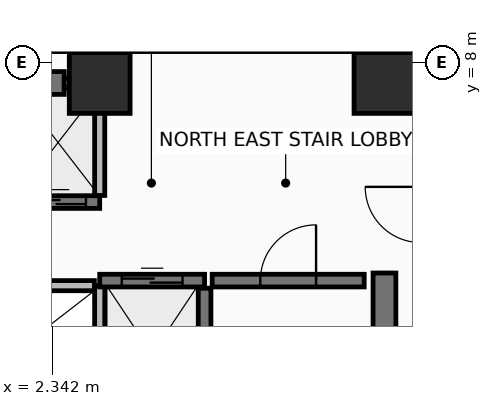
"""IFC4 building model, lengths in metres.
Left out: names, types, materials, properties, quantities, classifications, styles, units other than length and angle.
Written with IfcOpenShell. Run it as: python <this file> out.ifc"""

import sys

from ifc_helpers import new_model, si_unit, direction, frame, frame_2d, origin, origin_2d, place, context, subcontext, project, spatial, rectangle, extrude, element, fill, save


model = new_model("IFC4")
c1 = context("Model", 3, precision=1e-05, world=origin(), true_north=direction((0.0, 1.0)))
c2 = subcontext(c1, "Body", "Model", "MODEL_VIEW")
j1 = project(units=[si_unit("LENGTHUNIT", "METRE"), si_unit("PLANEANGLEUNIT", "RADIAN")], contexts=[c1])
p1 = place(None, origin())
s1 = spatial("IfcSite", under=j1, at=p1, CompositionType="ELEMENT")
p2 = place(p1, origin())
s2 = spatial("IfcBuilding", under=s1, at=p2, CompositionType="ELEMENT")
p3 = place(p2, frame((0.0, 0.0, 107.7)))
s3 = spatial("IfcBuildingStorey", under=s2, at=p3, CompositionType="ELEMENT", Elevation=107.7)
for number, where, z_axis, x_axis in (
    (1, (8.9, 7.6, 0.0), (0.0, 0.0, 1.0), (1.0, 0.0, 0.0)),
    (2, (3.28, 7.6, 0.0), (0.0, 0.0, 1.0), (1.0, 0.0, 0.0)),
):
    element("IfcColumn", number, at=place(p3, frame(where, z_axis=z_axis, x_axis=x_axis)), inside=s3, PredefinedType="COLUMN", context=c2, shape_type="SweptSolid", body=[
        extrude(rectangle(XDim=1.2, YDim=1.2, at=origin_2d()), origin(), (0.0, 0.0, 1.0), 4.75),
    ])
p4 = place(p3, frame((-2.8, 7.6, 0.0), z_axis=(0.0, 0.0, 1.0), x_axis=(1.0, 0.0, 0.0)))
e3 = element("IfcWall", 3, at=p4, inside=s3, PredefinedType="SHEAR", context=c2, shape_type="SweptSolid", body=[
    extrude(rectangle(XDim=5.38, YDim=0.45, at=frame_2d((2.69, 0.0))), origin(), (0.0, 0.0, 1.0), 4.56),
])
p5 = place(p3, frame((8.9, -6.85, 0.0), z_axis=(0.0, 0.0, 1.0), x_axis=(0.0, 1.0, 0.0)))
e4 = element("IfcWall", 4, at=p5, inside=s3, PredefinedType="SHEAR", context=c2, shape_type="SweptSolid", body=[
    extrude(rectangle(XDim=10.7, YDim=0.45, at=frame_2d((5.35, 0.0))), origin(), (0.0, 0.0, 1.0), 4.56),
])
p6 = place(p3, frame((5.35, -3.75, 0.0), z_axis=(0.0, 0.0, 1.0), x_axis=(0.0, 1.0, 0.0)))
e5 = element("IfcWall", 5, at=p6, inside=s3, PredefinedType="SHEAR", context=c2, shape_type="SweptSolid", body=[
    extrude(rectangle(XDim=7.3, YDim=0.25, at=frame_2d((3.65, 0.0))), origin(), (0.0, 0.0, 1.0), 4.56),
])
p7 = place(p3, frame((5.5, 3.7, 0.0), z_axis=(0.0, 0.0, 1.0), x_axis=(1.0, 0.0, 0.0)))
e6 = element("IfcWall", 6, at=p7, inside=s3, PredefinedType="SHEAR", context=c2, shape_type="SweptSolid", body=[
    extrude(rectangle(XDim=3.0, YDim=0.25, at=frame_2d((1.5, 0.0))), origin(), (0.0, 0.0, 1.0), 4.56),
])
p8 = place(p7, frame((0.95, 0.0, 0.0)))
e7 = element("IfcOpeningElement", 7, at=p8, cuts=e6, PredefinedType="OPENING", context=c2, shape_type="SweptSolid", body=[
    extrude(rectangle(XDim=1.1, YDim=2.15, at=frame_2d((0.55, 1.075))), frame((0.0, 0.135, 0.0), z_axis=(0.0, -1.0, 0.0), x_axis=(1.0, 0.0, 0.0)), (0.0, 0.0, 1.0), 0.27),
])
p9 = place(p3, frame((1.637, 5.25, 0.0), z_axis=(0.0, 0.0, 1.0), x_axis=(1.0, 0.0, 0.0)))
e8 = element("IfcWall", 8, at=p9, inside=s3, PredefinedType="SHEAR", context=c2, shape_type="SweptSolid", body=[
    extrude(rectangle(XDim=1.643, YDim=0.25, at=frame_2d((0.821, 0.0))), origin(), (0.0, 0.0, 1.0), 4.56),
])
p10 = place(p9, frame((0.271, 0.0, 0.0)))
e9 = element("IfcOpeningElement", 9, at=p10, cuts=e8, PredefinedType="OPENING", context=c2, shape_type="SweptSolid", body=[
    extrude(rectangle(XDim=1.1, YDim=2.2, at=frame_2d((0.55, 1.1))), frame((0.0, 0.135, 0.0), z_axis=(0.0, -1.0, 0.0), x_axis=(1.0, 0.0, 0.0)), (0.0, 0.0, 1.0), 0.27),
])
p11 = place(p3, frame((2.58, 7.6, 0.0), z_axis=(0.0, 0.0, 1.0), x_axis=(1.0, 0.0, 0.0)))
e10 = element("IfcWall", 10, at=p11, inside=s3, PredefinedType="PARTITIONING", context=c2, shape_type="SweptSolid", body=[
    extrude(rectangle(XDim=0.7, YDim=0.2, at=frame_2d((0.35, 0.0))), origin(), (0.0, 0.0, 1.0), 2.355),
])
p12 = place(p3, frame((3.28, 5.38, 0.0), z_axis=(0.0, 0.0, 1.0), x_axis=(0.0, 1.0, 0.0)))
e11 = element("IfcWall", 11, at=p12, inside=s3, PredefinedType="PARTITIONING", context=c2, shape_type="SweptSolid", body=[
    extrude(rectangle(XDim=2.115, YDim=0.2, at=frame_2d((1.058, 0.0))), origin(), (0.0, 0.0, 1.0), 2.355),
])
p13 = place(p3, frame((3.28, 1.8, 0.0), z_axis=(0.0, 0.0, 1.0), x_axis=(0.0, 1.0, 0.0)))
e12 = element("IfcWall", 12, at=p13, inside=s3, PredefinedType="PARTITIONING", context=c2, shape_type="SweptSolid", body=[
    extrude(rectangle(XDim=1.8, YDim=0.2, at=frame_2d((0.9, 0.0))), origin(), (0.0, 0.0, 1.0), 4.56),
])
p14 = place(p3, frame((1.13, 3.6, 0.0), z_axis=(0.0, 0.0, 1.0), x_axis=(1.0, 0.0, 0.0)))
e13 = element("IfcWall", 13, at=p14, inside=s3, PredefinedType="PARTITIONING", context=c2, shape_type="SweptSolid", body=[
    extrude(rectangle(XDim=2.045, YDim=0.2, at=frame_2d((1.022, 0.0))), origin(), (0.0, 0.0, 1.0), 3.755),
])
p15 = place(p3, frame((3.28, 3.7, 0.0), z_axis=(0.0, 0.0, 1.0), x_axis=(1.0, 0.0, 0.0)))
e14 = element("IfcWall", 14, at=p15, inside=s3, PredefinedType="SHEAR", context=c2, shape_type="SweptSolid", body=[
    extrude(rectangle(XDim=2.07, YDim=0.25, at=frame_2d((1.035, 0.0))), origin(), (0.0, 0.0, 1.0), 4.56),
])
p16 = place(p15, frame((0.435, 0.0, 0.0)))
e15 = element("IfcOpeningElement", 15, at=p16, cuts=e14, PredefinedType="OPENING", context=c2, shape_type="SweptSolid", body=[
    extrude(rectangle(XDim=1.2, YDim=2.2, at=frame_2d((0.6, 1.1))), frame((0.0, 0.135, 0.0), z_axis=(0.0, -1.0, 0.0), x_axis=(1.0, 0.0, 0.0)), (0.0, 0.0, 1.0), 0.27),
])
p17 = place(p8, frame((1.1, 0.0, 0.0), z_axis=(0.0, 0.0, 1.0), x_axis=(-1.0, 0.0, 0.0)))
e16 = element("IfcDoor", 16, at=p17, inside=s3, OperationType="SINGLE_SWING_LEFT", PredefinedType="DOOR", context=c2, shape_type="SweptSolid", body=[
    extrude(rectangle(XDim=1.1, YDim=2.15, at=frame_2d((0.55, 1.075))), frame((0.0, 0.025, 0.0), z_axis=(0.0, -1.0, 0.0), x_axis=(1.0, 0.0, 0.0)), (0.0, 0.0, 1.0), 0.05),
])
fill(e7, e16)
p18 = place(p10, origin())
e17 = element("IfcDoor", 17, at=p18, inside=s3, OperationType="SLIDING_TO_LEFT", PredefinedType="DOOR", context=c2, shape_type="SweptSolid", body=[
    extrude(rectangle(XDim=1.1, YDim=2.2, at=frame_2d((0.55, 1.1))), frame((0.0, 0.025, 0.0), z_axis=(0.0, -1.0, 0.0), x_axis=(1.0, 0.0, 0.0)), (0.0, 0.0, 1.0), 0.05),
])
fill(e9, e17)
p19 = place(p16, origin())
e18 = element("IfcDoor", 18, at=p19, inside=s3, OperationType="SLIDING_TO_RIGHT", PredefinedType="DOOR", context=c2, shape_type="SweptSolid", body=[
    extrude(rectangle(XDim=1.2, YDim=2.2, at=frame_2d((0.6, 1.1))), frame((0.0, 0.025, 0.0), z_axis=(0.0, -1.0, 0.0), x_axis=(1.0, 0.0, 0.0)), (0.0, 0.0, 1.0), 0.05),
])
fill(e15, e18)
save(model, sys.argv[1])
